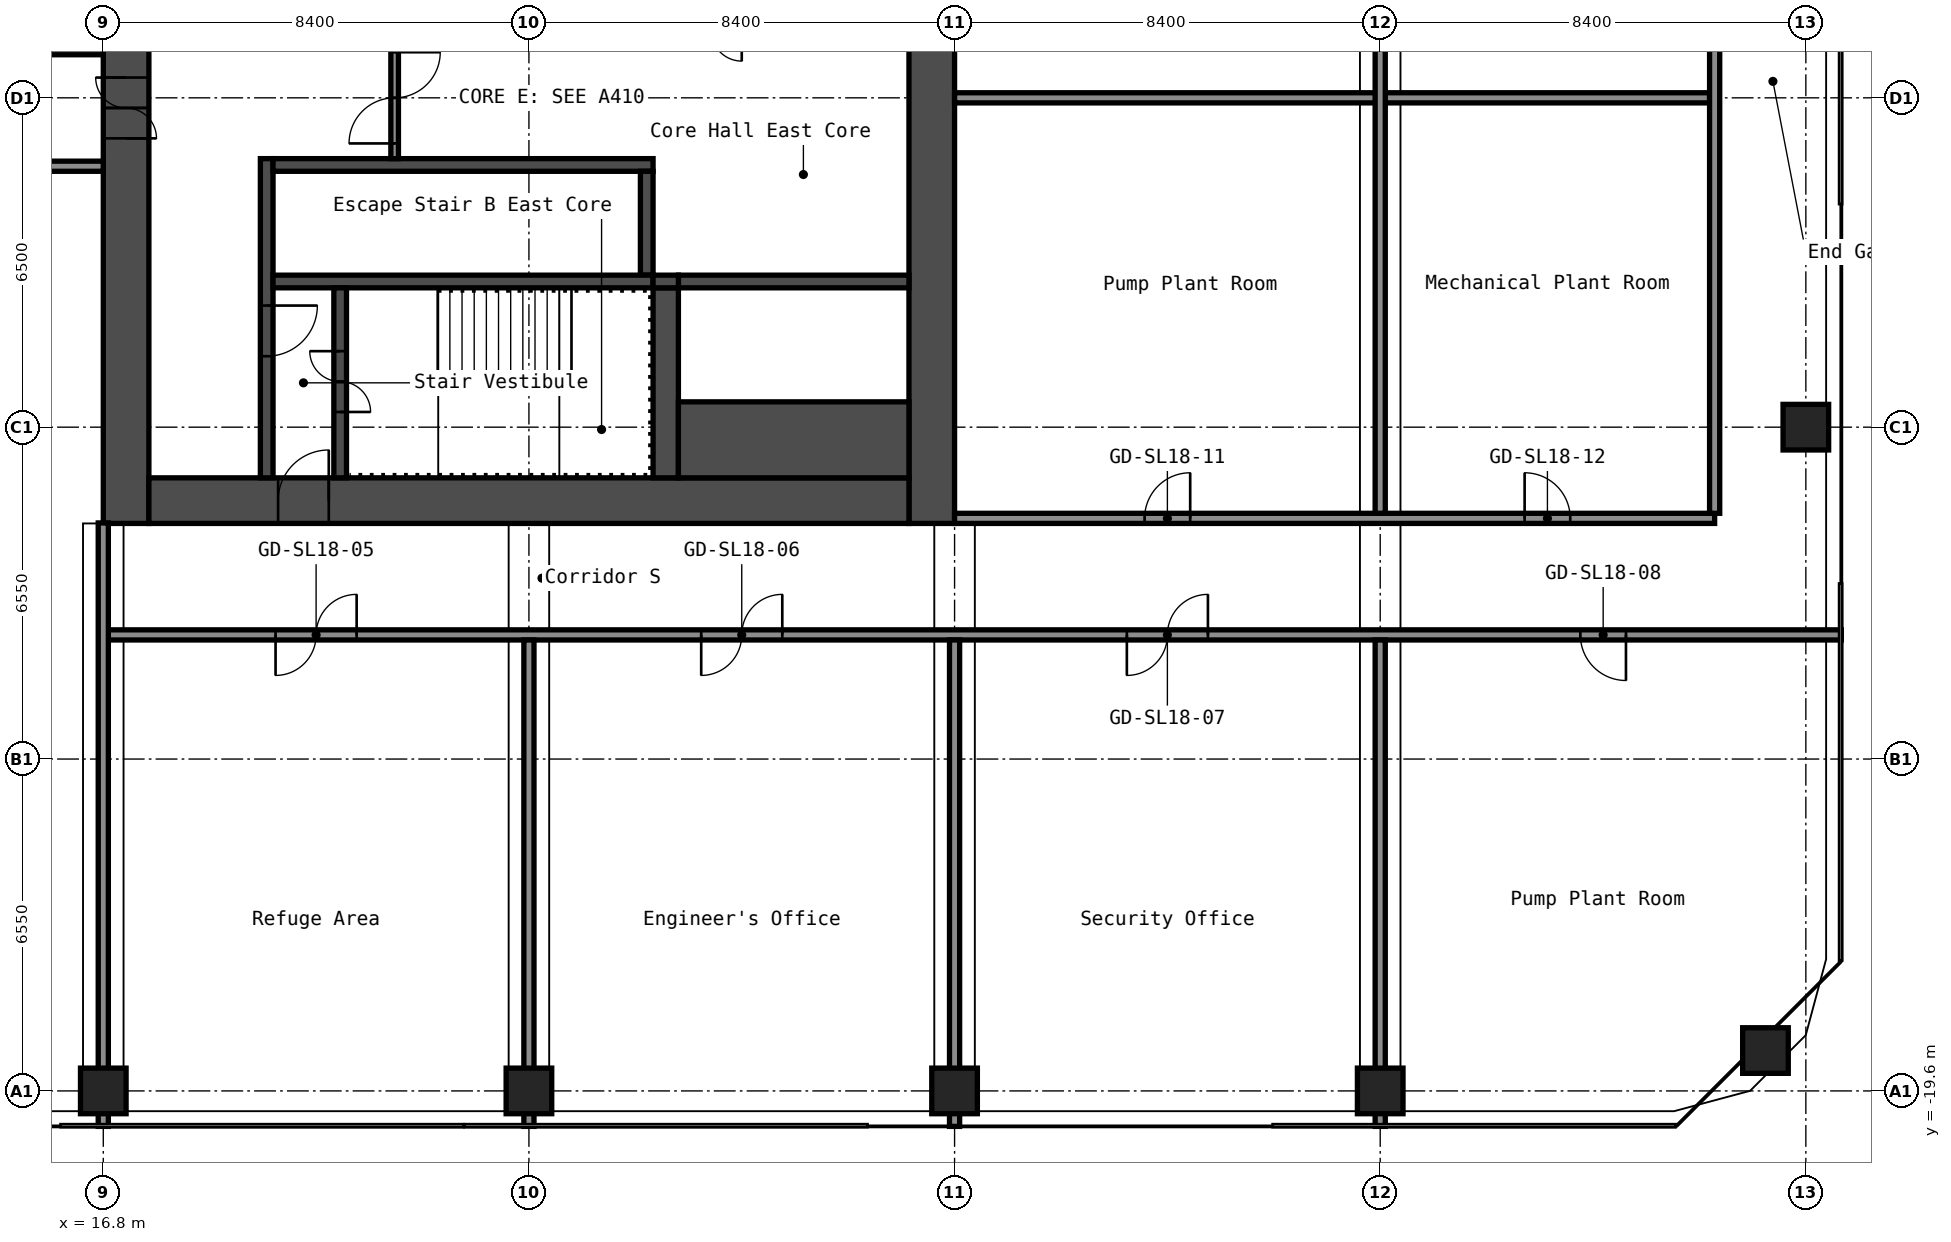
"""IFC4 building model, lengths in metres.
Left out: names, types, materials, properties, quantities, classifications, styles, units other than length and angle.
Written with IfcOpenShell. Run it as: python <this file> out.ifc"""

import sys

from ifc_helpers import new_model, si_unit, direction, frame, frame_2d, origin, origin_2d, place, context, subcontext, project, spatial, rectangle, hollow_rectangle, extrude, element, fill, save


model = new_model("IFC4")
c1 = context("Model", 3, precision=1e-05, world=origin(), true_north=direction((0.0, 1.0)))
c2 = subcontext(c1, "Body", "Model", "MODEL_VIEW")
j1 = project(units=[si_unit("LENGTHUNIT", "METRE"), si_unit("PLANEANGLEUNIT", "RADIAN")], contexts=[c1])
p1 = place(None, origin())
s1 = spatial("IfcSite", under=j1, at=p1, CompositionType="ELEMENT")
p2 = place(p1, origin())
s2 = spatial("IfcBuilding", under=s1, at=p2, CompositionType="ELEMENT")
p3 = place(p2, frame((0.0, 0.0, 64.6)))
s3 = spatial("IfcBuildingStorey", under=s2, at=p3, CompositionType="ELEMENT", Elevation=64.6)
for number, where, z_axis, x_axis in (
    (1, (16.8, -19.6, 0.0), (0.0, 0.0, 1.0), (1.0, 0.0, 0.0)),
    (2, (25.2, -19.6, 0.0), (0.0, 0.0, 1.0), (1.0, 0.0, 0.0)),
    (3, (33.6, -19.6, 0.0), (0.0, 0.0, 1.0), (1.0, 0.0, 0.0)),
    (4, (42.0, -19.6, 0.0), (0.0, 0.0, 1.0), (1.0, 0.0, 0.0)),
    (5, (49.603, -18.803, 0.0), (0.0, 0.0, 1.0), (1.0, 0.0, 0.0)),
    (6, (50.4, -6.5, 0.0), (0.0, 0.0, 1.0), (1.0, 0.0, 0.0)),
):
    element("IfcColumn", number, at=place(p3, frame(where, z_axis=z_axis, x_axis=x_axis)), inside=s3, PredefinedType="COLUMN", context=c2, shape_type="SweptSolid", body=[
        extrude(hollow_rectangle(XDim=0.9, YDim=0.9, WallThickness=0.036, at=origin_2d()), origin(), (0.0, 0.0, 1.0), 4.1),
    ])
p4 = place(p3, frame((17.25, -8.4, 0.0), z_axis=(0.0, 0.0, 1.0), x_axis=(0.0, 1.0, 0.0)))
e7 = element("IfcWall", 7, at=p4, inside=s3, PredefinedType="SHEAR", context=c2, shape_type="SweptSolid", body=[
    extrude(rectangle(XDim=16.8, YDim=0.9, at=frame_2d((8.4, 0.0))), origin(), (0.0, 0.0, 1.0), 4.1),
])
p5 = place(p4, frame((7.6, 0.0, 0.0)))
e8 = element("IfcOpeningElement", 8, at=p5, cuts=e7, PredefinedType="OPENING", context=c2, shape_type="SweptSolid", body=[
    extrude(rectangle(XDim=1.2, YDim=2.1, at=frame_2d((0.6, 1.05))), frame((0.0, 0.46, 0.0), z_axis=(0.0, -1.0, 0.0), x_axis=(1.0, 0.0, 0.0)), (0.0, 0.0, 1.0), 0.92),
])
p6 = place(p3, frame((33.15, -8.4, 0.0), z_axis=(0.0, 0.0, 1.0), x_axis=(0.0, 1.0, 0.0)))
e9 = element("IfcWall", 9, at=p6, inside=s3, PredefinedType="SHEAR", context=c2, shape_type="SweptSolid", body=[
    extrude(rectangle(XDim=16.8, YDim=0.9, at=frame_2d((8.4, 0.0))), origin(), (0.0, 0.0, 1.0), 4.1),
])
p7 = place(p3, frame((17.7, -7.95, 0.0), z_axis=(0.0, 0.0, 1.0), x_axis=(1.0, 0.0, 0.0)))
e10 = element("IfcWall", 10, at=p7, inside=s3, PredefinedType="SHEAR", context=c2, shape_type="SweptSolid", body=[
    extrude(rectangle(XDim=15.0, YDim=0.9, at=frame_2d((7.5, 0.0))), origin(), (0.0, 0.0, 1.0), 4.1),
])
p8 = place(p7, frame((2.55, 0.0, 0.0)))
e11 = element("IfcOpeningElement", 11, at=p8, cuts=e10, PredefinedType="OPENING", context=c2, shape_type="SweptSolid", body=[
    extrude(rectangle(XDim=1.0, YDim=2.1, at=frame_2d((0.5, 1.05))), frame((0.0, 0.46, 0.0), z_axis=(0.0, -1.0, 0.0), x_axis=(1.0, 0.0, 0.0)), (0.0, 0.0, 1.0), 0.92),
])
p9 = place(p3, frame((20.025, -7.5, 0.0), z_axis=(0.0, 0.0, 1.0), x_axis=(0.0, 1.0, 0.0)))
e12 = element("IfcWall", 12, at=p9, inside=s3, PredefinedType="SHEAR", context=c2, shape_type="SweptSolid", body=[
    extrude(rectangle(XDim=6.3, YDim=0.25, at=frame_2d((3.15, 0.0))), origin(), (0.0, 0.0, 1.0), 4.1),
])
p10 = place(p9, frame((2.4, 0.0, 0.0)))
e13 = element("IfcOpeningElement", 13, at=p10, cuts=e12, PredefinedType="OPENING", context=c2, shape_type="SweptSolid", body=[
    extrude(rectangle(XDim=1.0, YDim=2.1, at=frame_2d((0.5, 1.05))), frame((0.0, 0.135, 0.0), z_axis=(0.0, -1.0, 0.0), x_axis=(1.0, 0.0, 0.0)), (0.0, 0.0, 1.0), 0.27),
])
p11 = place(p3, frame((20.15, -1.325, 0.0), z_axis=(0.0, 0.0, 1.0), x_axis=(1.0, 0.0, 0.0)))
e14 = element("IfcWall", 14, at=p11, inside=s3, PredefinedType="SHEAR", context=c2, shape_type="SweptSolid", body=[
    extrude(rectangle(XDim=7.5, YDim=0.25, at=frame_2d((3.75, 0.0))), origin(), (0.0, 0.0, 1.0), 4.1),
])
p12 = place(p3, frame((27.525, -3.5, 0.0), z_axis=(0.0, 0.0, 1.0), x_axis=(0.0, 1.0, 0.0)))
e15 = element("IfcWall", 15, at=p12, inside=s3, PredefinedType="SHEAR", context=c2, shape_type="SweptSolid", body=[
    extrude(rectangle(XDim=2.05, YDim=0.25, at=frame_2d((1.025, 0.0))), origin(), (0.0, 0.0, 1.0), 4.1),
])
p13 = place(p3, frame((20.15, -3.625, 0.0), z_axis=(0.0, 0.0, 1.0), x_axis=(1.0, 0.0, 0.0)))
e16 = element("IfcWall", 16, at=p13, inside=s3, PredefinedType="SHEAR", context=c2, shape_type="SweptSolid", body=[
    extrude(rectangle(XDim=7.5, YDim=0.25, at=frame_2d((3.75, 0.0))), origin(), (0.0, 0.0, 1.0), 4.1),
])
p14 = place(p3, frame((21.475, -7.5, 0.0), z_axis=(0.0, 0.0, 1.0), x_axis=(0.0, 1.0, 0.0)))
e17 = element("IfcWall", 17, at=p14, inside=s3, PredefinedType="SHEAR", context=c2, shape_type="SweptSolid", body=[
    extrude(rectangle(XDim=3.75, YDim=0.25, at=frame_2d((1.875, 0.0))), origin(), (0.0, 0.0, 1.0), 4.1),
])
p15 = place(p14, frame((1.3, 0.0, 0.0)))
e18 = element("IfcOpeningElement", 18, at=p15, cuts=e17, PredefinedType="OPENING", context=c2, shape_type="SweptSolid", body=[
    extrude(rectangle(XDim=1.2, YDim=2.1, at=frame_2d((0.6, 1.05))), frame((0.0, 0.135, 0.0), z_axis=(0.0, -1.0, 0.0), x_axis=(1.0, 0.0, 0.0)), (0.0, 0.0, 1.0), 0.27),
])
p16 = place(p3, frame((27.9, -7.5, 0.0), z_axis=(0.0, 0.0, 1.0), x_axis=(0.0, 1.0, 0.0)))
e19 = element("IfcWall", 19, at=p16, inside=s3, PredefinedType="SHEAR", context=c2, shape_type="SweptSolid", body=[
    extrude(rectangle(XDim=3.75, YDim=0.5, at=frame_2d((1.875, 0.0))), origin(), (0.0, 0.0, 1.0), 4.1),
])
p17 = place(p3, frame((28.15, -3.625, 0.0), z_axis=(0.0, 0.0, 1.0), x_axis=(1.0, 0.0, 0.0)))
e20 = element("IfcWall", 20, at=p17, inside=s3, PredefinedType="SHEAR", context=c2, shape_type="SweptSolid", body=[
    extrude(rectangle(XDim=4.55, YDim=0.25, at=frame_2d((2.275, 0.0))), origin(), (0.0, 0.0, 1.0), 4.1),
])
p18 = place(p3, frame((28.15, -6.75, 0.0), z_axis=(0.0, 0.0, 1.0), x_axis=(1.0, 0.0, 0.0)))
e21 = element("IfcWall", 21, at=p18, inside=s3, PredefinedType="SHEAR", context=c2, shape_type="SweptSolid", body=[
    extrude(rectangle(XDim=4.55, YDim=1.5, at=frame_2d((2.275, 0.0))), origin(), (0.0, 0.0, 1.0), 4.1),
])
p19 = place(p3, frame((27.65, -3.625, 0.0), z_axis=(0.0, 0.0, 1.0), x_axis=(1.0, 0.0, 0.0)))
e22 = element("IfcWall", 22, at=p19, inside=s3, PredefinedType="SHEAR", context=c2, shape_type="SweptSolid", body=[
    extrude(rectangle(XDim=0.5, YDim=0.25, at=frame_2d((0.25, 0.0))), origin(), (0.0, 0.0, 1.0), 4.1),
])
p20 = place(p3, frame((22.55, -1.2, 0.0), z_axis=(0.0, 0.0, 1.0), x_axis=(0.0, 1.0, 0.0)))
e23 = element("IfcWall", 23, at=p20, inside=s3, PredefinedType="PARTITIONING", context=c2, shape_type="SweptSolid", body=[
    extrude(rectangle(XDim=2.4, YDim=0.15, at=frame_2d((1.2, 0.0))), origin(), (0.0, 0.0, 1.0), 4.1),
])
p21 = place(p20, frame((0.3, 0.0, 0.0)))
e24 = element("IfcOpeningElement", 24, at=p21, cuts=e23, PredefinedType="OPENING", context=c2, shape_type="SweptSolid", body=[
    extrude(rectangle(XDim=1.8, YDim=2.1, at=frame_2d((0.9, 1.05))), frame((0.0, 0.085, 0.0), z_axis=(0.0, -1.0, 0.0), x_axis=(1.0, 0.0, 0.0)), (0.0, 0.0, 1.0), 0.17),
])
p22 = place(p3, frame((16.8, -10.6, 0.0), z_axis=(0.0, 0.0, 1.0), x_axis=(1.0, 0.0, 0.0)))
e25 = element("IfcWall", 25, at=p22, inside=s3, PredefinedType="PARTITIONING", context=c2, shape_type="SweptSolid", body=[
    extrude(rectangle(XDim=34.3, YDim=0.2, at=frame_2d((17.15, 0.0))), origin(), (0.0, 0.0, 1.0), 4.1),
])
p23 = place(p22, frame((3.4, 0.0, 0.0)))
e26 = element("IfcOpeningElement", 26, at=p23, cuts=e25, PredefinedType="OPENING", context=c2, shape_type="SweptSolid", body=[
    extrude(rectangle(XDim=1.6, YDim=2.1, at=frame_2d((0.8, 1.05))), frame((0.0, 0.11, 0.0), z_axis=(0.0, -1.0, 0.0), x_axis=(1.0, 0.0, 0.0)), (0.0, 0.0, 1.0), 0.22),
])
p24 = place(p22, frame((11.8, 0.0, 0.0)))
e27 = element("IfcOpeningElement", 27, at=p24, cuts=e25, PredefinedType="OPENING", context=c2, shape_type="SweptSolid", body=[
    extrude(rectangle(XDim=1.6, YDim=2.1, at=frame_2d((0.8, 1.05))), frame((0.0, 0.11, 0.0), z_axis=(0.0, -1.0, 0.0), x_axis=(1.0, 0.0, 0.0)), (0.0, 0.0, 1.0), 0.22),
])
p25 = place(p22, frame((20.2, 0.0, 0.0)))
e28 = element("IfcOpeningElement", 28, at=p25, cuts=e25, PredefinedType="OPENING", context=c2, shape_type="SweptSolid", body=[
    extrude(rectangle(XDim=1.6, YDim=2.1, at=frame_2d((0.8, 1.05))), frame((0.0, 0.11, 0.0), z_axis=(0.0, -1.0, 0.0), x_axis=(1.0, 0.0, 0.0)), (0.0, 0.0, 1.0), 0.22),
])
p26 = place(p22, frame((29.15, 0.0, 0.0)))
e29 = element("IfcOpeningElement", 29, at=p26, cuts=e25, PredefinedType="OPENING", context=c2, shape_type="SweptSolid", body=[
    extrude(rectangle(XDim=0.9, YDim=2.1, at=frame_2d((0.45, 1.05))), frame((0.0, 0.11, 0.0), z_axis=(0.0, -1.0, 0.0), x_axis=(1.0, 0.0, 0.0)), (0.0, 0.0, 1.0), 0.22),
])
p27 = place(p3, frame((33.6, -8.3, 0.0), z_axis=(0.0, 0.0, 1.0), x_axis=(1.0, 0.0, 0.0)))
e30 = element("IfcWall", 30, at=p27, inside=s3, PredefinedType="PARTITIONING", context=c2, shape_type="SweptSolid", body=[
    extrude(rectangle(XDim=15.0, YDim=0.2, at=frame_2d((7.5, 0.0))), origin(), (0.0, 0.0, 1.0), 4.1),
])
p28 = place(p27, frame((3.75, 0.0, 0.0)))
e31 = element("IfcOpeningElement", 31, at=p28, cuts=e30, PredefinedType="OPENING", context=c2, shape_type="SweptSolid", body=[
    extrude(rectangle(XDim=0.9, YDim=2.1, at=frame_2d((0.45, 1.05))), frame((0.0, 0.11, 0.0), z_axis=(0.0, -1.0, 0.0), x_axis=(1.0, 0.0, 0.0)), (0.0, 0.0, 1.0), 0.22),
])
p29 = place(p27, frame((11.25, 0.0, 0.0)))
e32 = element("IfcOpeningElement", 32, at=p29, cuts=e30, PredefinedType="OPENING", context=c2, shape_type="SweptSolid", body=[
    extrude(rectangle(XDim=0.9, YDim=2.1, at=frame_2d((0.45, 1.05))), frame((0.0, 0.11, 0.0), z_axis=(0.0, -1.0, 0.0), x_axis=(1.0, 0.0, 0.0)), (0.0, 0.0, 1.0), 0.22),
])
p30 = place(p3, frame((-16.8, -1.35, 0.0), z_axis=(0.0, 0.0, 1.0), x_axis=(1.0, 0.0, 0.0)))
e33 = element("IfcWall", 33, at=p30, inside=s3, PredefinedType="PARTITIONING", context=c2, shape_type="SweptSolid", body=[
    extrude(rectangle(XDim=33.6, YDim=0.2, at=frame_2d((16.8, 0.0))), origin(), (0.0, 0.0, 1.0), 4.1),
])
p31 = place(p30, frame((3.4, 0.0, 0.0)))
e34 = element("IfcOpeningElement", 34, at=p31, cuts=e33, PredefinedType="OPENING", context=c2, shape_type="SweptSolid", body=[
    extrude(rectangle(XDim=1.6, YDim=2.1, at=frame_2d((0.8, 1.05))), frame((0.0, 0.11, 0.0), z_axis=(0.0, -1.0, 0.0), x_axis=(1.0, 0.0, 0.0)), (0.0, 0.0, 1.0), 0.22),
])
p32 = place(p30, frame((11.8, 0.0, 0.0)))
e35 = element("IfcOpeningElement", 35, at=p32, cuts=e33, PredefinedType="OPENING", context=c2, shape_type="SweptSolid", body=[
    extrude(rectangle(XDim=1.6, YDim=2.1, at=frame_2d((0.8, 1.05))), frame((0.0, 0.11, 0.0), z_axis=(0.0, -1.0, 0.0), x_axis=(1.0, 0.0, 0.0)), (0.0, 0.0, 1.0), 0.22),
])
p33 = place(p30, frame((20.55, 0.0, 0.0)))
e36 = element("IfcOpeningElement", 36, at=p33, cuts=e33, PredefinedType="OPENING", context=c2, shape_type="SweptSolid", body=[
    extrude(rectangle(XDim=0.9, YDim=2.1, at=frame_2d((0.45, 1.05))), frame((0.0, 0.11, 0.0), z_axis=(0.0, -1.0, 0.0), x_axis=(1.0, 0.0, 0.0)), (0.0, 0.0, 1.0), 0.22),
])
p34 = place(p30, frame((28.95, 0.0, 0.0)))
e37 = element("IfcOpeningElement", 37, at=p34, cuts=e33, PredefinedType="OPENING", context=c2, shape_type="SweptSolid", body=[
    extrude(rectangle(XDim=0.9, YDim=2.1, at=frame_2d((0.45, 1.05))), frame((0.0, 0.11, 0.0), z_axis=(0.0, -1.0, 0.0), x_axis=(1.0, 0.0, 0.0)), (0.0, 0.0, 1.0), 0.22),
])
p35 = place(p3, frame((33.6, 0.0, 0.0), z_axis=(0.0, 0.0, 1.0), x_axis=(1.0, 0.0, 0.0)))
e38 = element("IfcWall", 38, at=p35, inside=s3, PredefinedType="PARTITIONING", context=c2, shape_type="SweptSolid", body=[
    extrude(rectangle(XDim=14.9, YDim=0.2, at=frame_2d((7.45, 0.0))), origin(), (0.0, 0.0, 1.0), 4.1),
])
p36 = place(p3, frame((-16.8, 0.95, 0.0), z_axis=(0.0, 0.0, 1.0), x_axis=(1.0, 0.0, 0.0)))
e39 = element("IfcWall", 39, at=p36, inside=s3, PredefinedType="PARTITIONING", context=c2, shape_type="SweptSolid", body=[
    extrude(rectangle(XDim=33.6, YDim=0.2, at=frame_2d((16.8, 0.0))), origin(), (0.0, 0.0, 1.0), 4.1),
])
p37 = place(p36, frame((12.15, 0.0, 0.0)))
e40 = element("IfcOpeningElement", 40, at=p37, cuts=e39, PredefinedType="OPENING", context=c2, shape_type="SweptSolid", body=[
    extrude(rectangle(XDim=0.9, YDim=2.1, at=frame_2d((0.45, 1.05))), frame((0.0, 0.11, 0.0), z_axis=(0.0, -1.0, 0.0), x_axis=(1.0, 0.0, 0.0)), (0.0, 0.0, 1.0), 0.22),
])
p38 = place(p36, frame((28.6, 0.0, 0.0)))
e41 = element("IfcOpeningElement", 41, at=p38, cuts=e39, PredefinedType="OPENING", context=c2, shape_type="SweptSolid", body=[
    extrude(rectangle(XDim=1.6, YDim=2.1, at=frame_2d((0.8, 1.05))), frame((0.0, 0.11, 0.0), z_axis=(0.0, -1.0, 0.0), x_axis=(1.0, 0.0, 0.0)), (0.0, 0.0, 1.0), 0.22),
])
p39 = place(p3, frame((16.8, -20.3, 0.0), z_axis=(0.0, 0.0, 1.0), x_axis=(0.0, 1.0, 0.0)))
e42 = element("IfcWall", 42, at=p39, inside=s3, PredefinedType="PARTITIONING", context=c2, shape_type="SweptSolid", body=[
    extrude(rectangle(XDim=11.91, YDim=0.2, at=frame_2d((5.955, 0.0))), origin(), (0.0, 0.0, 1.0), 4.1),
])
for number, where, z_axis, x_axis in (
    (43, (25.2, -20.3, 0.0), (0.0, 0.0, 1.0), (0.0, 1.0, 0.0)),
    (44, (33.6, -20.3, 0.0), (0.0, 0.0, 1.0), (0.0, 1.0, 0.0)),
    (45, (42.0, -20.3, 0.0), (0.0, 0.0, 1.0), (0.0, 1.0, 0.0)),
):
    element("IfcWall", number, at=place(p3, frame(where, z_axis=z_axis, x_axis=x_axis)), inside=s3, PredefinedType="PARTITIONING", context=c2, shape_type="SweptSolid", body=[
        extrude(rectangle(XDim=9.6, YDim=0.2, at=frame_2d((4.8, 0.0))), origin(), (0.0, 0.0, 1.0), 4.1),
    ])
for number, where, z_axis, x_axis in (
    (46, (42.0, -8.2, 0.0), (0.0, 0.0, 1.0), (0.0, 1.0, 0.0)),
    (47, (48.6, -8.2, 0.0), (0.0, 0.0, 1.0), (0.0, 1.0, 0.0)),
):
    element("IfcWall", number, at=place(p3, frame(where, z_axis=z_axis, x_axis=x_axis)), inside=s3, PredefinedType="PARTITIONING", context=c2, shape_type="SweptSolid", body=[
        extrude(rectangle(XDim=16.4, YDim=0.2, at=frame_2d((8.2, 0.0))), origin(), (0.0, 0.0, 1.0), 4.1),
    ])
p40 = place(p5, origin())
e48 = element("IfcDoor", 48, at=p40, inside=s3, OperationType="DOUBLE_DOOR_SINGLE_SWING", PredefinedType="DOOR", context=c2, shape_type="SweptSolid", body=[
    extrude(rectangle(XDim=1.2, YDim=2.1, at=frame_2d((0.6, 1.05))), frame((0.0, 0.025, 0.0), z_axis=(0.0, -1.0, 0.0), x_axis=(1.0, 0.0, 0.0)), (0.0, 0.0, 1.0), 0.05),
])
fill(e8, e48)
p41 = place(p8, origin())
e49 = element("IfcDoor", 49, at=p41, inside=s3, OperationType="SINGLE_SWING_LEFT", PredefinedType="DOOR", context=c2, shape_type="SweptSolid", body=[
    extrude(rectangle(XDim=1.0, YDim=2.1, at=frame_2d((0.5, 1.05))), frame((0.0, 0.025, 0.0), z_axis=(0.0, -1.0, 0.0), x_axis=(1.0, 0.0, 0.0)), (0.0, 0.0, 1.0), 0.05),
])
fill(e11, e49)
p42 = place(p15, origin())
e50 = element("IfcDoor", 50, at=p42, inside=s3, OperationType="DOUBLE_DOOR_SINGLE_SWING", PredefinedType="DOOR", context=c2, shape_type="SweptSolid", body=[
    extrude(rectangle(XDim=1.2, YDim=2.1, at=frame_2d((0.6, 1.05))), frame((0.0, 0.025, 0.0), z_axis=(0.0, -1.0, 0.0), x_axis=(1.0, 0.0, 0.0)), (0.0, 0.0, 1.0), 0.05),
])
fill(e18, e50)
p43 = place(p10, origin())
e51 = element("IfcDoor", 51, at=p43, inside=s3, OperationType="SINGLE_SWING_RIGHT", PredefinedType="DOOR", context=c2, shape_type="SweptSolid", body=[
    extrude(rectangle(XDim=1.0, YDim=2.1, at=frame_2d((0.5, 1.05))), frame((0.0, 0.025, 0.0), z_axis=(0.0, -1.0, 0.0), x_axis=(1.0, 0.0, 0.0)), (0.0, 0.0, 1.0), 0.05),
])
fill(e13, e51)
p44 = place(p21, origin())
e52 = element("IfcDoor", 52, at=p44, inside=s3, OperationType="DOUBLE_DOOR_SINGLE_SWING", PredefinedType="DOOR", context=c2, shape_type="SweptSolid", body=[
    extrude(rectangle(XDim=1.8, YDim=2.1, at=frame_2d((0.9, 1.05))), frame((0.0, 0.025, 0.0), z_axis=(0.0, -1.0, 0.0), x_axis=(1.0, 0.0, 0.0)), (0.0, 0.0, 1.0), 0.05),
])
fill(e24, e52)
p45 = place(p23, origin())
e53 = element("IfcDoor", 53, at=p45, inside=s3, OperationType="DOUBLE_DOOR_SINGLE_SWING", PredefinedType="DOOR", context=c2, shape_type="SweptSolid", body=[
    extrude(rectangle(XDim=1.6, YDim=2.1, at=frame_2d((0.8, 1.05))), frame((0.0, 0.025, 0.0), z_axis=(0.0, -1.0, 0.0), x_axis=(1.0, 0.0, 0.0)), (0.0, 0.0, 1.0), 0.05),
])
fill(e26, e53)
p46 = place(p24, origin())
e54 = element("IfcDoor", 54, at=p46, inside=s3, OperationType="DOUBLE_DOOR_SINGLE_SWING", PredefinedType="DOOR", context=c2, shape_type="SweptSolid", body=[
    extrude(rectangle(XDim=1.6, YDim=2.1, at=frame_2d((0.8, 1.05))), frame((0.0, 0.025, 0.0), z_axis=(0.0, -1.0, 0.0), x_axis=(1.0, 0.0, 0.0)), (0.0, 0.0, 1.0), 0.05),
])
fill(e27, e54)
p47 = place(p25, origin())
e55 = element("IfcDoor", 55, at=p47, inside=s3, OperationType="DOUBLE_DOOR_SINGLE_SWING", PredefinedType="DOOR", context=c2, shape_type="SweptSolid", body=[
    extrude(rectangle(XDim=1.6, YDim=2.1, at=frame_2d((0.8, 1.05))), frame((0.0, 0.025, 0.0), z_axis=(0.0, -1.0, 0.0), x_axis=(1.0, 0.0, 0.0)), (0.0, 0.0, 1.0), 0.05),
])
fill(e28, e55)
p48 = place(p26, origin())
e56 = element("IfcDoor", 56, at=p48, inside=s3, OperationType="SINGLE_SWING_RIGHT", PredefinedType="DOOR", context=c2, shape_type="SweptSolid", body=[
    extrude(rectangle(XDim=0.9, YDim=2.1, at=frame_2d((0.45, 1.05))), frame((0.0, 0.025, 0.0), z_axis=(0.0, -1.0, 0.0), x_axis=(1.0, 0.0, 0.0)), (0.0, 0.0, 1.0), 0.05),
])
fill(e29, e56)
p49 = place(p28, origin())
e57 = element("IfcDoor", 57, at=p49, inside=s3, OperationType="SINGLE_SWING_LEFT", PredefinedType="DOOR", context=c2, shape_type="SweptSolid", body=[
    extrude(rectangle(XDim=0.9, YDim=2.1, at=frame_2d((0.45, 1.05))), frame((0.0, 0.025, 0.0), z_axis=(0.0, -1.0, 0.0), x_axis=(1.0, 0.0, 0.0)), (0.0, 0.0, 1.0), 0.05),
])
fill(e31, e57)
p50 = place(p29, origin())
e58 = element("IfcDoor", 58, at=p50, inside=s3, OperationType="SINGLE_SWING_RIGHT", PredefinedType="DOOR", context=c2, shape_type="SweptSolid", body=[
    extrude(rectangle(XDim=0.9, YDim=2.1, at=frame_2d((0.45, 1.05))), frame((0.0, 0.025, 0.0), z_axis=(0.0, -1.0, 0.0), x_axis=(1.0, 0.0, 0.0)), (0.0, 0.0, 1.0), 0.05),
])
fill(e32, e58)
save(model, sys.argv[1])
